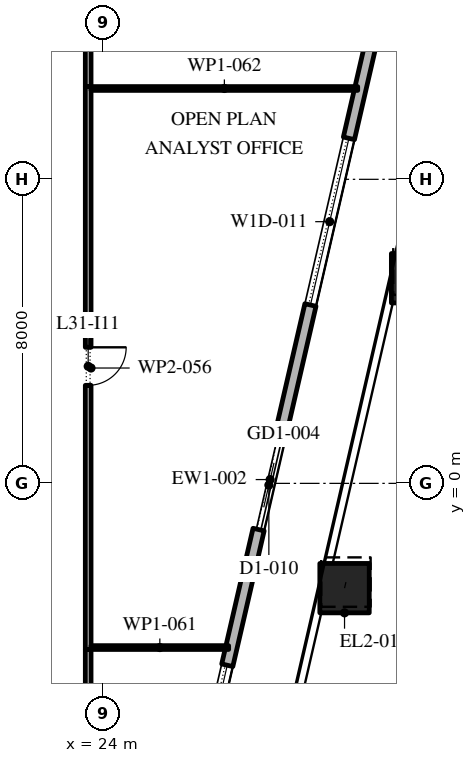
"""IFC4 building model, lengths in metres.
Left out: names, types, materials, properties, quantities, classifications, styles, units other than length and angle.
Written with IfcOpenShell. Run it as: python <this file> out.ifc"""

import sys

from ifc_helpers import new_model, si_unit, direction, frame, frame_2d, origin, origin_2d, place, context, subcontext, project, spatial, rectangle, extrude, element, fill, save


model = new_model("IFC4")
c1 = context("Model", 3, precision=1e-05, world=origin(), true_north=direction((0.0, 1.0)))
c2 = subcontext(c1, "Body", "Model", "MODEL_VIEW")
j1 = project(units=[si_unit("LENGTHUNIT", "METRE"), si_unit("PLANEANGLEUNIT", "RADIAN")], contexts=[c1])
p1 = place(None, origin())
s1 = spatial("IfcSite", under=j1, at=p1, CompositionType="ELEMENT")
p2 = place(p1, origin())
s2 = spatial("IfcBuilding", under=s1, at=p2, CompositionType="ELEMENT")
p3 = place(p2, frame((0.0, 0.0, 143.4)))
s3 = spatial("IfcBuildingStorey", under=s2, at=p3, CompositionType="ELEMENT", Elevation=143.4)
p4 = place(p3, frame((30.345, -2.757, 0.0), z_axis=(0.008712278909, 0.037985536045, 0.999240309059), x_axis=(-0.974691740237, 0.22355315143, 0.0)))
e1 = element("IfcColumn", 1, at=p4, inside=s3, PredefinedType="COLUMN", context=c2, shape_type="SweptSolid", body=[
    extrude(rectangle(XDim=1.3, YDim=1.3, at=origin_2d()), origin(), (0.0, 0.0, 1.0), 4.203),
])
p5 = place(p3, frame((32.228, 5.397, 0.0), z_axis=(0.011667624972, 0.050501660328, 0.998655821007), x_axis=(-0.974334539389, 0.225104876342, 0.0)))
e2 = element("IfcColumn", 2, at=p5, inside=s3, PredefinedType="COLUMN", context=c2, shape_type="SweptSolid", body=[
    extrude(rectangle(XDim=1.3, YDim=1.3, at=origin_2d()), origin(), (0.0, 0.0, 1.0), 4.206),
])
p6 = place(p3, frame((22.82, -24.016, 0.0), z_axis=(0.0, 0.0, 1.0), x_axis=(0.224953880882, 0.974369412223, 0.0)))
e3 = element("IfcWall", 3, at=p6, inside=s3, PredefinedType="STANDARD", context=c2, shape_type="SweptSolid", body=[
    extrude(rectangle(XDim=49.5, YDim=0.3, at=frame_2d((24.75, 0.0))), origin(), (0.0, 0.0, 1.0), 4.0),
])
p7 = place(p6, frame((1.157, 0.0, 0.45)))
e4 = element("IfcOpeningElement", 4, at=p7, cuts=e3, PredefinedType="OPENING", context=c2, shape_type="SweptSolid", body=[
    extrude(rectangle(XDim=4.5, YDim=3.05, at=frame_2d((2.25, 1.525))), frame((0.0, 0.16, 0.0), z_axis=(0.0, -1.0, 0.0), x_axis=(1.0, 0.0, 0.0)), (0.0, 0.0, 1.0), 0.32),
])
p8 = place(p6, frame((8.121, 0.0, 0.45)))
e5 = element("IfcOpeningElement", 5, at=p8, cuts=e3, PredefinedType="OPENING", context=c2, shape_type="SweptSolid", body=[
    extrude(rectangle(XDim=4.5, YDim=3.05, at=frame_2d((2.25, 1.525))), frame((0.0, 0.16, 0.0), z_axis=(0.0, -1.0, 0.0), x_axis=(1.0, 0.0, 0.0)), (0.0, 0.0, 1.0), 0.32),
])
p9 = place(p6, frame((15.236, 0.0, 0.45)))
e6 = element("IfcOpeningElement", 6, at=p9, cuts=e3, PredefinedType="OPENING", context=c2, shape_type="SweptSolid", body=[
    extrude(rectangle(XDim=4.5, YDim=3.05, at=frame_2d((2.25, 1.525))), frame((0.0, 0.16, 0.0), z_axis=(0.0, -1.0, 0.0), x_axis=(1.0, 0.0, 0.0)), (0.0, 0.0, 1.0), 0.32),
])
p10 = place(p6, frame((23.4, 0.0, 0.0)))
e7 = element("IfcOpeningElement", 7, at=p10, cuts=e3, PredefinedType="OPENING", context=c2, shape_type="SweptSolid", body=[
    extrude(rectangle(XDim=2.4, YDim=3.5, at=frame_2d((1.2, 1.75))), frame((0.0, 0.16, 0.0), z_axis=(0.0, -1.0, 0.0), x_axis=(1.0, 0.0, 0.0)), (0.0, 0.0, 1.0), 0.32),
])
p11 = place(p6, frame((29.464, 0.0, 0.45)))
e8 = element("IfcOpeningElement", 8, at=p11, cuts=e3, PredefinedType="OPENING", context=c2, shape_type="SweptSolid", body=[
    extrude(rectangle(XDim=4.5, YDim=2.875, at=frame_2d((2.25, 1.438))), frame((0.0, 0.16, 0.0), z_axis=(0.0, -1.0, 0.0), x_axis=(1.0, 0.0, 0.0)), (0.0, 0.0, 1.0), 0.32),
])
p12 = place(p6, frame((36.579, 0.0, 0.45)))
e9 = element("IfcOpeningElement", 9, at=p12, cuts=e3, PredefinedType="OPENING", context=c2, shape_type="SweptSolid", body=[
    extrude(rectangle(XDim=4.5, YDim=2.825, at=frame_2d((2.25, 1.413))), frame((0.0, 0.16, 0.0), z_axis=(0.0, -1.0, 0.0), x_axis=(1.0, 0.0, 0.0)), (0.0, 0.0, 1.0), 0.32),
])
p13 = place(p6, frame((43.693, 0.0, 0.45)))
e10 = element("IfcOpeningElement", 10, at=p13, cuts=e3, PredefinedType="OPENING", context=c2, shape_type="SweptSolid", body=[
    extrude(rectangle(XDim=4.5, YDim=2.75, at=frame_2d((2.25, 1.375))), frame((0.0, 0.16, 0.0), z_axis=(0.0, -1.0, 0.0), x_axis=(1.0, 0.0, 0.0)), (0.0, 0.0, 1.0), 0.32),
])
p14 = place(p3, frame((23.6, -4.37, 0.0), z_axis=(0.0, 0.0, 1.0), x_axis=(0.0, -1.0, 0.0)))
e11 = element("IfcWall", 11, at=p14, inside=s3, PredefinedType="PARTITIONING", context=c2, shape_type="SweptSolid", body=[
    extrude(rectangle(XDim=2.855, YDim=0.15, at=frame_2d((1.427, 0.0))), origin(), (0.0, 0.0, 1.0), 4.0),
])
p15 = place(p3, frame((23.6, 10.44, 0.0), z_axis=(0.0, 0.0, 1.0), x_axis=(0.0, -1.0, 0.0)))
e12 = element("IfcWall", 12, at=p15, inside=s3, PredefinedType="PARTITIONING", context=c2, shape_type="SweptSolid", body=[
    extrude(rectangle(XDim=14.81, YDim=0.15, at=frame_2d((7.405, 0.0))), origin(), (0.0, 0.0, 1.0), 4.0),
])
p16 = place(p15, frame((6.86, 0.0, 0.0)))
e13 = element("IfcOpeningElement", 13, at=p16, cuts=e12, PredefinedType="OPENING", context=c2, shape_type="SweptSolid", body=[
    extrude(rectangle(XDim=1.0, YDim=2.1, at=frame_2d((0.5, 1.05))), frame((0.0, 0.085, 0.0), z_axis=(0.0, -1.0, 0.0), x_axis=(1.0, 0.0, 0.0)), (0.0, 0.0, 1.0), 0.17),
])
p17 = place(p3, frame((23.6, 23.46, 0.0), z_axis=(0.0, 0.0, 1.0), x_axis=(0.0, -1.0, 0.0)))
e14 = element("IfcWall", 14, at=p17, inside=s3, PredefinedType="PARTITIONING", context=c2, shape_type="SweptSolid", body=[
    extrude(rectangle(XDim=13.02, YDim=0.15, at=frame_2d((6.51, 0.0))), origin(), (0.0, 0.0, 1.0), 4.0),
])
p18 = place(p17, frame((6.17, 0.0, 0.0)))
e15 = element("IfcOpeningElement", 15, at=p18, cuts=e14, PredefinedType="OPENING", context=c2, shape_type="SweptSolid", body=[
    extrude(rectangle(XDim=1.0, YDim=2.1, at=frame_2d((0.5, 1.05))), frame((0.0, 0.085, 0.0), z_axis=(0.0, -1.0, 0.0), x_axis=(1.0, 0.0, 0.0)), (0.0, 0.0, 1.0), 0.17),
])
p19 = place(p3, frame((27.296, -4.32, 0.0), z_axis=(0.0, 0.0, 1.0), x_axis=(-1.0, 0.0, 0.0)))
e16 = element("IfcWall", 16, at=p19, inside=s3, PredefinedType="PARTITIONING", context=c2, shape_type="SweptSolid", body=[
    extrude(rectangle(XDim=3.621, YDim=0.1, at=frame_2d((1.811, 0.0))), origin(), (0.0, 0.0, 1.0), 4.0),
])
p20 = place(p3, frame((30.692, 10.39, 0.0), z_axis=(0.0, 0.0, 1.0), x_axis=(-1.0, 0.0, 0.0)))
e17 = element("IfcWall", 17, at=p20, inside=s3, PredefinedType="PARTITIONING", context=c2, shape_type="SweptSolid", body=[
    extrude(rectangle(XDim=7.017, YDim=0.1, at=frame_2d((3.508, 0.0))), origin(), (0.0, 0.0, 1.0), 4.0),
])
p21 = place(p9, origin())
e18 = element("IfcWindow", 18, at=p21, inside=s3, PartitioningType="DOUBLE_PANEL_VERTICAL", PredefinedType="WINDOW", context=c2, shape_type="SweptSolid", body=[
    extrude(rectangle(XDim=4.5, YDim=3.05, at=frame_2d((2.25, 1.525))), frame((0.0, 0.03, 0.0), z_axis=(0.0, -1.0, 0.0), x_axis=(1.0, 0.0, 0.0)), (0.0, 0.0, 1.0), 0.06),
])
fill(e6, e18)
p22 = place(p10, origin())
e19 = element("IfcDoor", 19, at=p22, inside=s3, OperationType="DOUBLE_DOOR_SLIDING", PredefinedType="DOOR", context=c2, shape_type="SweptSolid", body=[
    extrude(rectangle(XDim=2.4, YDim=3.5, at=frame_2d((1.2, 1.75))), frame((0.0, 0.025, 0.0), z_axis=(0.0, -1.0, 0.0), x_axis=(1.0, 0.0, 0.0)), (0.0, 0.0, 1.0), 0.05),
])
fill(e7, e19)
p23 = place(p11, origin())
e20 = element("IfcWindow", 20, at=p23, inside=s3, PartitioningType="DOUBLE_PANEL_VERTICAL", PredefinedType="WINDOW", context=c2, shape_type="SweptSolid", body=[
    extrude(rectangle(XDim=4.5, YDim=2.875, at=frame_2d((2.25, 1.438))), frame((0.0, 0.03, 0.0), z_axis=(0.0, -1.0, 0.0), x_axis=(1.0, 0.0, 0.0)), (0.0, 0.0, 1.0), 0.06),
])
fill(e8, e20)
p24 = place(p16, origin())
e21 = element("IfcDoor", 21, at=p24, inside=s3, OperationType="SINGLE_SWING_RIGHT", PredefinedType="DOOR", context=c2, shape_type="SweptSolid", body=[
    extrude(rectangle(XDim=1.0, YDim=2.1, at=frame_2d((0.5, 1.05))), frame((0.0, 0.025, 0.0), z_axis=(0.0, -1.0, 0.0), x_axis=(1.0, 0.0, 0.0)), (0.0, 0.0, 1.0), 0.05),
])
fill(e13, e21)
save(model, sys.argv[1])
